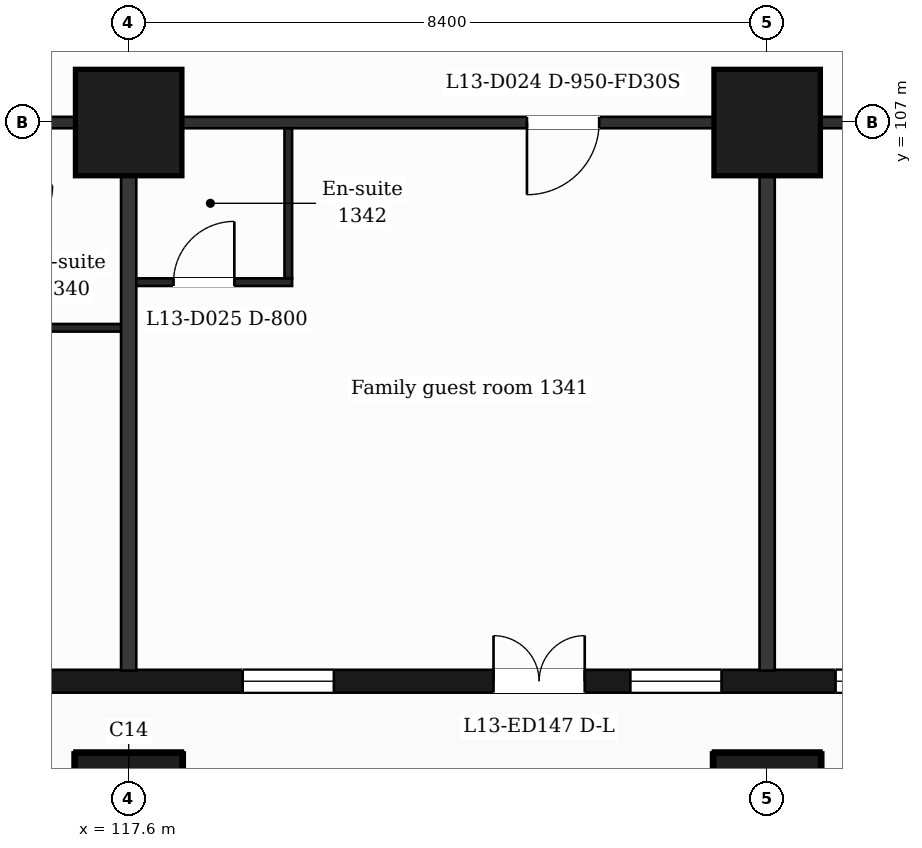
"""IFC4 building model, lengths in metres.
Left out: names, types, materials, properties, quantities, classifications, styles, units other than length and angle.
Written with IfcOpenShell. Run it as: python <this file> out.ifc"""

import sys

from ifc_helpers import new_model, si_unit, direction, frame, frame_2d, origin, origin_2d, place, context, subcontext, project, spatial, rectangle, extrude, element, fill, save


model = new_model("IFC4")
c1 = context("Model", 3, precision=1e-05, world=origin(), true_north=direction((0.0, 1.0)))
c2 = subcontext(c1, "Body", "Model", "MODEL_VIEW")
j1 = project(units=[si_unit("LENGTHUNIT", "METRE"), si_unit("PLANEANGLEUNIT", "RADIAN")], contexts=[c1])
p1 = place(None, origin())
s1 = spatial("IfcSite", under=j1, at=p1, CompositionType="ELEMENT")
p2 = place(p1, origin())
s2 = spatial("IfcBuilding", under=s1, at=p2, CompositionType="ELEMENT")
p3 = place(p2, frame((0.0, 0.0, 63.5)))
s3 = spatial("IfcBuildingStorey", under=s2, at=p3, CompositionType="ELEMENT", Elevation=63.5)
for number, where, z_axis, x_axis in (
    (1, (117.6, 98.0, 0.0), (0.0, 0.0, 1.0), (1.0, 0.0, 0.0)),
    (2, (126.0, 98.0, 0.0), (0.0, 0.0, 1.0), (1.0, 0.0, 0.0)),
    (3, (117.6, 107.0, 0.0), (0.0, 0.0, 1.0), (1.0, 0.0, 0.0)),
    (4, (126.0, 107.0, 0.0), (0.0, 0.0, 1.0), (1.0, 0.0, 0.0)),
):
    element("IfcColumn", number, at=place(p3, frame(where, z_axis=z_axis, x_axis=x_axis)), inside=s3, PredefinedType="COLUMN", context=c2, shape_type="SweptSolid", body=[
        extrude(rectangle(XDim=1.4, YDim=1.4, at=origin_2d()), origin(), (0.0, 0.0, 1.0), 3.5),
    ])
p4 = place(p3, frame((89.85, 99.65, 0.0), z_axis=(0.0, 0.0, 1.0), x_axis=(1.0, 0.0, 0.0)))
e5 = element("IfcWall", 5, at=p4, inside=s3, PredefinedType="SOLIDWALL", context=c2, shape_type="SweptSolid", body=[
    extrude(rectangle(XDim=47.25, YDim=0.3, at=frame_2d((23.625, 0.0))), origin(), (0.0, 0.0, 1.0), 3.18),
])
p5 = place(p4, frame((0.725, 0.0, 0.9)))
e6 = element("IfcOpeningElement", 6, at=p5, cuts=e5, PredefinedType="OPENING", context=c2, shape_type="SweptSolid", body=[
    extrude(rectangle(XDim=1.2, YDim=2.1, at=frame_2d((0.6, 1.05))), frame((0.0, 0.16, 0.0), z_axis=(0.0, -1.0, 0.0), x_axis=(1.0, 0.0, 0.0)), (0.0, 0.0, 1.0), 0.32),
])
p6 = place(p4, frame((3.45, 0.0, 0.9)))
e7 = element("IfcOpeningElement", 7, at=p6, cuts=e5, PredefinedType="OPENING", context=c2, shape_type="SweptSolid", body=[
    extrude(rectangle(XDim=2.4, YDim=2.1, at=frame_2d((1.2, 1.05))), frame((0.0, 0.16, 0.0), z_axis=(0.0, -1.0, 0.0), x_axis=(1.0, 0.0, 0.0)), (0.0, 0.0, 1.0), 0.32),
])
p7 = place(p4, frame((7.65, 0.0, 0.9)))
e8 = element("IfcOpeningElement", 8, at=p7, cuts=e5, PredefinedType="OPENING", context=c2, shape_type="SweptSolid", body=[
    extrude(rectangle(XDim=2.4, YDim=2.1, at=frame_2d((1.2, 1.05))), frame((0.0, 0.16, 0.0), z_axis=(0.0, -1.0, 0.0), x_axis=(1.0, 0.0, 0.0)), (0.0, 0.0, 1.0), 0.32),
])
p8 = place(p4, frame((11.85, 0.0, 0.9)))
e9 = element("IfcOpeningElement", 9, at=p8, cuts=e5, PredefinedType="OPENING", context=c2, shape_type="SweptSolid", body=[
    extrude(rectangle(XDim=2.4, YDim=2.1, at=frame_2d((1.2, 1.05))), frame((0.0, 0.16, 0.0), z_axis=(0.0, -1.0, 0.0), x_axis=(1.0, 0.0, 0.0)), (0.0, 0.0, 1.0), 0.32),
])
p9 = place(p4, frame((16.05, 0.0, 0.9)))
e10 = element("IfcOpeningElement", 10, at=p9, cuts=e5, PredefinedType="OPENING", context=c2, shape_type="SweptSolid", body=[
    extrude(rectangle(XDim=2.4, YDim=2.1, at=frame_2d((1.2, 1.05))), frame((0.0, 0.16, 0.0), z_axis=(0.0, -1.0, 0.0), x_axis=(1.0, 0.0, 0.0)), (0.0, 0.0, 1.0), 0.32),
])
p10 = place(p4, frame((20.25, 0.0, 0.9)))
e11 = element("IfcOpeningElement", 11, at=p10, cuts=e5, PredefinedType="OPENING", context=c2, shape_type="SweptSolid", body=[
    extrude(rectangle(XDim=2.4, YDim=2.1, at=frame_2d((1.2, 1.05))), frame((0.0, 0.16, 0.0), z_axis=(0.0, -1.0, 0.0), x_axis=(1.0, 0.0, 0.0)), (0.0, 0.0, 1.0), 0.32),
])
p11 = place(p4, frame((25.05, 0.0, 0.9)))
e12 = element("IfcOpeningElement", 12, at=p11, cuts=e5, PredefinedType="OPENING", context=c2, shape_type="SweptSolid", body=[
    extrude(rectangle(XDim=1.2, YDim=2.1, at=frame_2d((0.6, 1.05))), frame((0.0, 0.16, 0.0), z_axis=(0.0, -1.0, 0.0), x_axis=(1.0, 0.0, 0.0)), (0.0, 0.0, 1.0), 0.32),
])
p12 = place(p4, frame((29.25, 0.0, 0.9)))
e13 = element("IfcOpeningElement", 13, at=p12, cuts=e5, PredefinedType="OPENING", context=c2, shape_type="SweptSolid", body=[
    extrude(rectangle(XDim=1.2, YDim=2.1, at=frame_2d((0.6, 1.05))), frame((0.0, 0.16, 0.0), z_axis=(0.0, -1.0, 0.0), x_axis=(1.0, 0.0, 0.0)), (0.0, 0.0, 1.0), 0.32),
])
p13 = place(p4, frame((32.55, 0.0, 0.0)))
e14 = element("IfcOpeningElement", 14, at=p13, cuts=e5, PredefinedType="OPENING", context=c2, shape_type="SweptSolid", body=[
    extrude(rectangle(XDim=1.2, YDim=2.4, at=frame_2d((0.6, 1.2))), frame((0.0, 0.16, 0.0), z_axis=(0.0, -1.0, 0.0), x_axis=(1.0, 0.0, 0.0)), (0.0, 0.0, 1.0), 0.32),
])
p14 = place(p4, frame((34.35, 0.0, 0.9)))
e15 = element("IfcOpeningElement", 15, at=p14, cuts=e5, PredefinedType="OPENING", context=c2, shape_type="SweptSolid", body=[
    extrude(rectangle(XDim=1.2, YDim=2.1, at=frame_2d((0.6, 1.05))), frame((0.0, 0.16, 0.0), z_axis=(0.0, -1.0, 0.0), x_axis=(1.0, 0.0, 0.0)), (0.0, 0.0, 1.0), 0.32),
])
p15 = place(p4, frame((37.05, 0.0, 0.9)))
e16 = element("IfcOpeningElement", 16, at=p15, cuts=e5, PredefinedType="OPENING", context=c2, shape_type="SweptSolid", body=[
    extrude(rectangle(XDim=2.4, YDim=2.1, at=frame_2d((1.2, 1.05))), frame((0.0, 0.16, 0.0), z_axis=(0.0, -1.0, 0.0), x_axis=(1.0, 0.0, 0.0)), (0.0, 0.0, 1.0), 0.32),
])
p16 = place(p4, frame((40.95, 0.0, 0.0)))
e17 = element("IfcOpeningElement", 17, at=p16, cuts=e5, PredefinedType="OPENING", context=c2, shape_type="SweptSolid", body=[
    extrude(rectangle(XDim=1.2, YDim=2.4, at=frame_2d((0.6, 1.2))), frame((0.0, 0.16, 0.0), z_axis=(0.0, -1.0, 0.0), x_axis=(1.0, 0.0, 0.0)), (0.0, 0.0, 1.0), 0.32),
])
p17 = place(p4, frame((42.75, 0.0, 0.9)))
e18 = element("IfcOpeningElement", 18, at=p17, cuts=e5, PredefinedType="OPENING", context=c2, shape_type="SweptSolid", body=[
    extrude(rectangle(XDim=1.2, YDim=2.1, at=frame_2d((0.6, 1.05))), frame((0.0, 0.16, 0.0), z_axis=(0.0, -1.0, 0.0), x_axis=(1.0, 0.0, 0.0)), (0.0, 0.0, 1.0), 0.32),
])
p18 = place(p4, frame((45.25, 0.0, 0.9)))
e19 = element("IfcOpeningElement", 19, at=p18, cuts=e5, PredefinedType="OPENING", context=c2, shape_type="SweptSolid", body=[
    extrude(rectangle(XDim=1.2, YDim=2.1, at=frame_2d((0.6, 1.05))), frame((0.0, 0.16, 0.0), z_axis=(0.0, -1.0, 0.0), x_axis=(1.0, 0.0, 0.0)), (0.0, 0.0, 1.0), 0.32),
])
p19 = place(p3, frame((115.75, 104.3, 0.0), z_axis=(0.0, 0.0, 1.0), x_axis=(1.0, 0.0, 0.0)))
e20 = element("IfcWall", 20, at=p19, inside=s3, PredefinedType="PARTITIONING", context=c2, shape_type="SweptSolid", body=[
    extrude(rectangle(XDim=1.85, YDim=0.1, at=frame_2d((0.925, 0.0))), origin(), (0.0, 0.0, 1.0), 3.18),
])
p20 = place(p3, frame((117.6, 104.9, 0.0), z_axis=(0.0, 0.0, 1.0), x_axis=(1.0, 0.0, 0.0)))
e21 = element("IfcWall", 21, at=p20, inside=s3, PredefinedType="PARTITIONING", context=c2, shape_type="SweptSolid", body=[
    extrude(rectangle(XDim=2.15, YDim=0.1, at=frame_2d((1.075, 0.0))), origin(), (0.0, 0.0, 1.0), 3.18),
])
p21 = place(p20, frame((0.59, 0.0, 0.0)))
e22 = element("IfcOpeningElement", 22, at=p21, cuts=e21, PredefinedType="OPENING", context=c2, shape_type="SweptSolid", body=[
    extrude(rectangle(XDim=0.8, YDim=2.1, at=frame_2d((0.4, 1.05))), frame((0.0, 0.06, 0.0), z_axis=(0.0, -1.0, 0.0), x_axis=(1.0, 0.0, 0.0)), (0.0, 0.0, 1.0), 0.12),
])
p22 = place(p3, frame((87.018, 107.0, 0.0), z_axis=(0.0, 0.0, 1.0), x_axis=(1.0, 0.0, 0.0)))
e23 = element("IfcWall", 23, at=p22, inside=s3, PredefinedType="PARTITIONING", context=c2, shape_type="SweptSolid", body=[
    extrude(rectangle(XDim=52.765, YDim=0.15, at=frame_2d((26.382, 0.0))), origin(), (0.0, 0.0, 1.0), 3.18),
])
p23 = place(p22, frame((1.032, 0.0, 0.0)))
e24 = element("IfcOpeningElement", 24, at=p23, cuts=e23, PredefinedType="OPENING", context=c2, shape_type="SweptSolid", body=[
    extrude(rectangle(XDim=0.95, YDim=2.1, at=frame_2d((0.475, 1.05))), frame((0.0, 0.085, 0.0), z_axis=(0.0, -1.0, 0.0), x_axis=(1.0, 0.0, 0.0)), (0.0, 0.0, 1.0), 0.17),
])
p24 = place(p22, frame((6.894, 0.0, 0.0)))
e25 = element("IfcOpeningElement", 25, at=p24, cuts=e23, PredefinedType="OPENING", context=c2, shape_type="SweptSolid", body=[
    extrude(rectangle(XDim=0.95, YDim=2.1, at=frame_2d((0.475, 1.05))), frame((0.0, 0.085, 0.0), z_axis=(0.0, -1.0, 0.0), x_axis=(1.0, 0.0, 0.0)), (0.0, 0.0, 1.0), 0.17),
])
p25 = place(p22, frame((17.844, 0.0, 0.0)))
e26 = element("IfcOpeningElement", 26, at=p25, cuts=e23, PredefinedType="OPENING", context=c2, shape_type="SweptSolid", body=[
    extrude(rectangle(XDim=0.95, YDim=2.1, at=frame_2d((0.475, 1.05))), frame((0.0, 0.085, 0.0), z_axis=(0.0, -1.0, 0.0), x_axis=(1.0, 0.0, 0.0)), (0.0, 0.0, 1.0), 0.17),
])
p26 = place(p22, frame((26.245, 0.0, 0.0)))
e27 = element("IfcOpeningElement", 27, at=p26, cuts=e23, PredefinedType="OPENING", context=c2, shape_type="SweptSolid", body=[
    extrude(rectangle(XDim=0.95, YDim=2.1, at=frame_2d((0.475, 1.05))), frame((0.0, 0.085, 0.0), z_axis=(0.0, -1.0, 0.0), x_axis=(1.0, 0.0, 0.0)), (0.0, 0.0, 1.0), 0.17),
])
p27 = place(p22, frame((35.822, 0.0, 0.0)))
e28 = element("IfcOpeningElement", 28, at=p27, cuts=e23, PredefinedType="OPENING", context=c2, shape_type="SweptSolid", body=[
    extrude(rectangle(XDim=0.95, YDim=2.1, at=frame_2d((0.475, 1.05))), frame((0.0, 0.085, 0.0), z_axis=(0.0, -1.0, 0.0), x_axis=(1.0, 0.0, 0.0)), (0.0, 0.0, 1.0), 0.17),
])
p28 = place(p22, frame((42.302, 0.0, 0.0)))
e29 = element("IfcOpeningElement", 29, at=p28, cuts=e23, PredefinedType="OPENING", context=c2, shape_type="SweptSolid", body=[
    extrude(rectangle(XDim=0.95, YDim=2.1, at=frame_2d((0.475, 1.05))), frame((0.0, 0.085, 0.0), z_axis=(0.0, -1.0, 0.0), x_axis=(1.0, 0.0, 0.0)), (0.0, 0.0, 1.0), 0.17),
])
p29 = place(p22, frame((49.285, 0.0, 0.0)))
e30 = element("IfcOpeningElement", 30, at=p29, cuts=e23, PredefinedType="OPENING", context=c2, shape_type="SweptSolid", body=[
    extrude(rectangle(XDim=0.95, YDim=2.1, at=frame_2d((0.475, 1.05))), frame((0.0, 0.085, 0.0), z_axis=(0.0, -1.0, 0.0), x_axis=(1.0, 0.0, 0.0)), (0.0, 0.0, 1.0), 0.17),
])
p30 = place(p3, frame((117.6, 99.79, 0.0), z_axis=(0.0, 0.0, 1.0), x_axis=(0.0, 1.0, 0.0)))
e31 = element("IfcWall", 31, at=p30, inside=s3, PredefinedType="PARTITIONING", context=c2, shape_type="SweptSolid", body=[
    extrude(rectangle(XDim=7.135, YDim=0.2, at=frame_2d((3.567, 0.0))), origin(), (0.0, 0.0, 1.0), 3.18),
])
p31 = place(p3, frame((119.7, 104.95, 0.0), z_axis=(0.0, 0.0, 1.0), x_axis=(0.0, 1.0, 0.0)))
e32 = element("IfcWall", 32, at=p31, inside=s3, PredefinedType="PARTITIONING", context=c2, shape_type="SweptSolid", body=[
    extrude(rectangle(XDim=1.975, YDim=0.1, at=frame_2d((0.988, 0.0))), origin(), (0.0, 0.0, 1.0), 3.18),
])
p32 = place(p3, frame((126.0, 99.79, 0.0), z_axis=(0.0, 0.0, 1.0), x_axis=(0.0, 1.0, 0.0)))
e33 = element("IfcWall", 33, at=p32, inside=s3, PredefinedType="PARTITIONING", context=c2, shape_type="SweptSolid", body=[
    extrude(rectangle(XDim=7.135, YDim=0.2, at=frame_2d((3.567, 0.0))), origin(), (0.0, 0.0, 1.0), 3.18),
])
p33 = place(p12, origin())
e34 = element("IfcWindow", 34, at=p33, inside=s3, PartitioningType="SINGLE_PANEL", PredefinedType="WINDOW", context=c2, shape_type="SweptSolid", body=[
    extrude(rectangle(XDim=1.2, YDim=2.1, at=frame_2d((0.6, 1.05))), frame((0.0, 0.03, 0.0), z_axis=(0.0, -1.0, 0.0), x_axis=(1.0, 0.0, 0.0)), (0.0, 0.0, 1.0), 0.06),
])
fill(e13, e34)
p34 = place(p13, origin())
e35 = element("IfcDoor", 35, at=p34, inside=s3, OperationType="DOUBLE_DOOR_SINGLE_SWING", PredefinedType="DOOR", context=c2, shape_type="SweptSolid", body=[
    extrude(rectangle(XDim=1.2, YDim=2.4, at=frame_2d((0.6, 1.2))), frame((0.0, 0.025, 0.0), z_axis=(0.0, -1.0, 0.0), x_axis=(1.0, 0.0, 0.0)), (0.0, 0.0, 1.0), 0.05),
])
fill(e14, e35)
p35 = place(p14, origin())
e36 = element("IfcWindow", 36, at=p35, inside=s3, PartitioningType="SINGLE_PANEL", PredefinedType="WINDOW", context=c2, shape_type="SweptSolid", body=[
    extrude(rectangle(XDim=1.2, YDim=2.1, at=frame_2d((0.6, 1.05))), frame((0.0, 0.03, 0.0), z_axis=(0.0, -1.0, 0.0), x_axis=(1.0, 0.0, 0.0)), (0.0, 0.0, 1.0), 0.06),
])
fill(e15, e36)
p36 = place(p15, origin())
e37 = element("IfcWindow", 37, at=p36, inside=s3, PartitioningType="SINGLE_PANEL", PredefinedType="WINDOW", context=c2, shape_type="SweptSolid", body=[
    extrude(rectangle(XDim=2.4, YDim=2.1, at=frame_2d((1.2, 1.05))), frame((0.0, 0.03, 0.0), z_axis=(0.0, -1.0, 0.0), x_axis=(1.0, 0.0, 0.0)), (0.0, 0.0, 1.0), 0.06),
])
fill(e16, e37)
p37 = place(p27, origin())
e38 = element("IfcDoor", 38, at=p37, inside=s3, OperationType="SINGLE_SWING_LEFT", PredefinedType="DOOR", context=c2, shape_type="SweptSolid", body=[
    extrude(rectangle(XDim=0.95, YDim=2.1, at=frame_2d((0.475, 1.05))), frame((0.0, 0.025, 0.0), z_axis=(0.0, -1.0, 0.0), x_axis=(1.0, 0.0, 0.0)), (0.0, 0.0, 1.0), 0.05),
])
fill(e28, e38)
p38 = place(p21, origin())
e39 = element("IfcDoor", 39, at=p38, inside=s3, OperationType="SINGLE_SWING_RIGHT", PredefinedType="DOOR", context=c2, shape_type="SweptSolid", body=[
    extrude(rectangle(XDim=0.8, YDim=2.1, at=frame_2d((0.4, 1.05))), frame((0.0, 0.025, 0.0), z_axis=(0.0, -1.0, 0.0), x_axis=(1.0, 0.0, 0.0)), (0.0, 0.0, 1.0), 0.05),
])
fill(e22, e39)
save(model, sys.argv[1])
